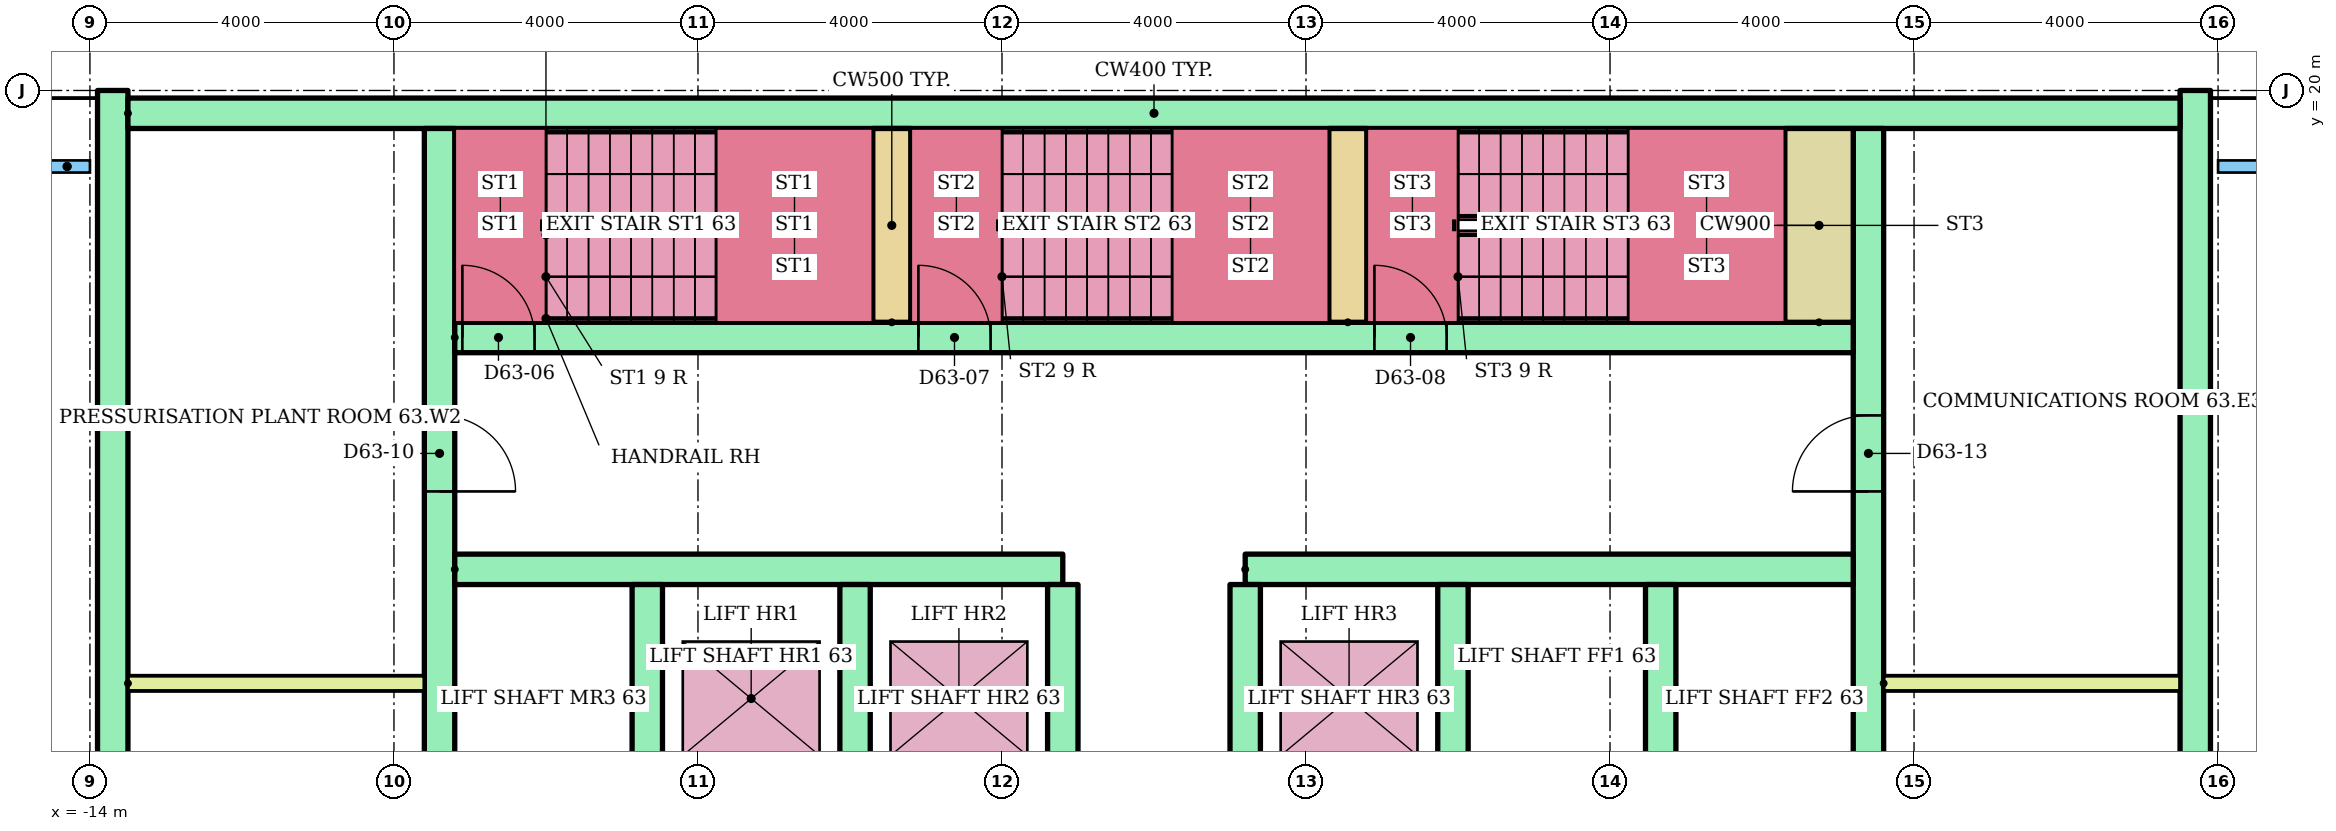
"""IFC4 building model, lengths in metres.
Left out: names, types, materials, properties, quantities, classifications, styles, units other than length and angle.
Written with IfcOpenShell. Run it as: python <this file> out.ifc"""

import sys

from ifc_helpers import new_model, si_unit, direction, frame, frame_2d, origin, place, context, subcontext, project, spatial, rectangle, extrude, element, fill, save


model = new_model("IFC4")
c1 = context("Model", 3, precision=1e-05, world=origin(), true_north=direction((0.0, 1.0)))
c2 = subcontext(c1, "Body", "Model", "MODEL_VIEW")
j1 = project(units=[si_unit("LENGTHUNIT", "METRE"), si_unit("PLANEANGLEUNIT", "RADIAN")], contexts=[c1])
p1 = place(None, origin())
s1 = spatial("IfcSite", under=j1, at=p1, CompositionType="ELEMENT")
p2 = place(p1, origin())
s2 = spatial("IfcBuilding", under=s1, at=p2, CompositionType="ELEMENT")
p3 = place(p2, frame((0.0, 0.0, 239.6)))
s3 = spatial("IfcBuildingStorey", under=s2, at=p3, CompositionType="ELEMENT", Elevation=239.6)
for number, where, z_axis, x_axis in (
    (1, (-13.7, 3.0, 0.0), (0.0, 0.0, 1.0), (0.0, 1.0, 0.0)),
    (2, (13.7, 3.0, 0.0), (0.0, 0.0, 1.0), (0.0, 1.0, 0.0)),
):
    element("IfcWall", number, at=place(p3, frame(where, z_axis=z_axis, x_axis=x_axis)), inside=s3, PredefinedType="SHEAR", context=c2, shape_type="SweptSolid", body=[
        extrude(rectangle(XDim=17.0, YDim=0.4, at=frame_2d((8.5, 0.0))), origin(), (0.0, 0.0, 1.0), 8.8),
    ])
p4 = place(p3, frame((-13.5, 19.7, 0.0)))
e3 = element("IfcWall", 3, at=p4, inside=s3, PredefinedType="SHEAR", context=c2, shape_type="SweptSolid", body=[
    extrude(rectangle(XDim=27.0, YDim=0.4, at=frame_2d((13.5, 0.0))), origin(), (0.0, 0.0, 1.0), 8.8),
])
p5 = place(p3, frame((-9.4, 6.8, 0.0), z_axis=(0.0, 0.0, 1.0), x_axis=(0.0, 1.0, 0.0)))
e4 = element("IfcWall", 4, at=p5, inside=s3, PredefinedType="SHEAR", context=c2, shape_type="SweptSolid", body=[
    extrude(rectangle(XDim=12.7, YDim=0.4, at=frame_2d((6.35, 0.0))), origin(), (0.0, 0.0, 1.0), 8.8),
])
p6 = place(p5, frame((1.15, 0.0, 0.0)))
e5 = element("IfcOpeningElement", 5, at=p6, cuts=e4, PredefinedType="OPENING", context=c2, shape_type="SweptSolid", body=[
    extrude(rectangle(XDim=1.0, YDim=2.1, at=frame_2d((0.5, 1.05))), frame((0.0, 0.21, 0.0), z_axis=(0.0, -1.0, 0.0), x_axis=(1.0, 0.0, 0.0)), (0.0, 0.0, 1.0), 0.42),
])
p7 = place(p5, frame((7.925, 0.0, 0.0)))
e6 = element("IfcOpeningElement", 6, at=p7, cuts=e4, PredefinedType="OPENING", context=c2, shape_type="SweptSolid", body=[
    extrude(rectangle(XDim=1.0, YDim=2.1, at=frame_2d((0.5, 1.05))), frame((0.0, 0.21, 0.0), z_axis=(0.0, -1.0, 0.0), x_axis=(1.0, 0.0, 0.0)), (0.0, 0.0, 1.0), 0.42),
])
p8 = place(p3, frame((9.4, 6.8, 0.0), z_axis=(0.0, 0.0, 1.0), x_axis=(0.0, 1.0, 0.0)))
e7 = element("IfcWall", 7, at=p8, inside=s3, PredefinedType="SHEAR", context=c2, shape_type="SweptSolid", body=[
    extrude(rectangle(XDim=12.7, YDim=0.4, at=frame_2d((6.35, 0.0))), origin(), (0.0, 0.0, 1.0), 8.8),
])
p9 = place(p8, frame((0.3, 0.0, 0.0)))
e8 = element("IfcOpeningElement", 8, at=p9, cuts=e7, PredefinedType="OPENING", context=c2, shape_type="SweptSolid", body=[
    extrude(rectangle(XDim=1.0, YDim=2.1, at=frame_2d((0.5, 1.05))), frame((0.0, 0.21, 0.0), z_axis=(0.0, -1.0, 0.0), x_axis=(1.0, 0.0, 0.0)), (0.0, 0.0, 1.0), 0.42),
])
p10 = place(p8, frame((2.05, 0.0, 0.0)))
e9 = element("IfcOpeningElement", 9, at=p10, cuts=e7, PredefinedType="OPENING", context=c2, shape_type="SweptSolid", body=[
    extrude(rectangle(XDim=1.0, YDim=2.1, at=frame_2d((0.5, 1.05))), frame((0.0, 0.21, 0.0), z_axis=(0.0, -1.0, 0.0), x_axis=(1.0, 0.0, 0.0)), (0.0, 0.0, 1.0), 0.42),
])
p11 = place(p8, frame((7.925, 0.0, 0.0)))
e10 = element("IfcOpeningElement", 10, at=p11, cuts=e7, PredefinedType="OPENING", context=c2, shape_type="SweptSolid", body=[
    extrude(rectangle(XDim=1.0, YDim=2.1, at=frame_2d((0.5, 1.05))), frame((0.0, 0.21, 0.0), z_axis=(0.0, -1.0, 0.0), x_axis=(1.0, 0.0, 0.0)), (0.0, 0.0, 1.0), 0.42),
])
for number, where in (
    (11, (-9.2, 13.7, 0.0)),
    (12, (1.2, 13.7, 0.0)),
):
    element("IfcWall", number, at=place(p3, frame(where)), inside=s3, PredefinedType="SHEAR", context=c2, shape_type="SweptSolid", body=[
        extrude(rectangle(XDim=8.0, YDim=0.4, at=frame_2d((4.0, 0.0))), origin(), (0.0, 0.0, 1.0), 8.8),
    ])
for number, where, z_axis, x_axis in (
    (13, (-6.667, 10.5, 0.0), (0.0, 0.0, 1.0), (0.0, 1.0, 0.0)),
    (14, (-3.933, 10.5, 0.0), (0.0, 0.0, 1.0), (0.0, 1.0, 0.0)),
    (15, (-1.2, 10.5, 0.0), (0.0, 0.0, 1.0), (0.0, 1.0, 0.0)),
    (16, (1.2, 10.5, 0.0), (0.0, 0.0, 1.0), (0.0, 1.0, 0.0)),
    (17, (3.933, 10.5, 0.0), (0.0, 0.0, 1.0), (0.0, 1.0, 0.0)),
    (18, (6.667, 10.5, 0.0), (0.0, 0.0, 1.0), (0.0, 1.0, 0.0)),
):
    element("IfcWall", number, at=place(p3, frame(where, z_axis=z_axis, x_axis=x_axis)), inside=s3, PredefinedType="SHEAR", context=c2, shape_type="SweptSolid", body=[
        extrude(rectangle(XDim=3.0, YDim=0.4, at=frame_2d((1.5, 0.0))), origin(), (0.0, 0.0, 1.0), 8.8),
    ])
p12 = place(p3, frame((-9.2, 16.75, 0.0)))
e19 = element("IfcWall", 19, at=p12, inside=s3, PredefinedType="SHEAR", context=c2, shape_type="SweptSolid", body=[
    extrude(rectangle(XDim=18.4, YDim=0.4, at=frame_2d((9.2, 0.0))), origin(), (0.0, 0.0, 1.0), 8.8),
])
p13 = place(p12, frame((0.1, 0.0, 0.0)))
e20 = element("IfcOpeningElement", 20, at=p13, cuts=e19, PredefinedType="OPENING", context=c2, shape_type="SweptSolid", body=[
    extrude(rectangle(XDim=0.95, YDim=2.1, at=frame_2d((0.475, 1.05))), frame((0.0, 0.21, 0.0), z_axis=(0.0, -1.0, 0.0), x_axis=(1.0, 0.0, 0.0)), (0.0, 0.0, 1.0), 0.42),
])
p14 = place(p12, frame((6.1, 0.0, 0.0)))
e21 = element("IfcOpeningElement", 21, at=p14, cuts=e19, PredefinedType="OPENING", context=c2, shape_type="SweptSolid", body=[
    extrude(rectangle(XDim=0.95, YDim=2.1, at=frame_2d((0.475, 1.05))), frame((0.0, 0.21, 0.0), z_axis=(0.0, -1.0, 0.0), x_axis=(1.0, 0.0, 0.0)), (0.0, 0.0, 1.0), 0.42),
])
p15 = place(p12, frame((12.1, 0.0, 0.0)))
e22 = element("IfcOpeningElement", 22, at=p15, cuts=e19, PredefinedType="OPENING", context=c2, shape_type="SweptSolid", body=[
    extrude(rectangle(XDim=0.95, YDim=2.1, at=frame_2d((0.475, 1.05))), frame((0.0, 0.21, 0.0), z_axis=(0.0, -1.0, 0.0), x_axis=(1.0, 0.0, 0.0)), (0.0, 0.0, 1.0), 0.42),
])
for number, where, z_axis, x_axis in (
    (23, (-3.45, 16.95, 0.0), (0.0, 0.0, 1.0), (0.0, 1.0, 0.0)),
    (24, (2.55, 16.95, 0.0), (0.0, 0.0, 1.0), (0.0, 1.0, 0.0)),
):
    element("IfcWall", number, at=place(p3, frame(where, z_axis=z_axis, x_axis=x_axis)), inside=s3, PredefinedType="SHEAR", context=c2, shape_type="SweptSolid", body=[
        extrude(rectangle(XDim=2.55, YDim=0.5, at=frame_2d((1.275, 0.0))), origin(), (0.0, 0.0, 1.0), 8.8),
    ])
p16 = place(p3, frame((8.75, 16.95, 0.0), z_axis=(0.0, 0.0, 1.0), x_axis=(0.0, 1.0, 0.0)))
e25 = element("IfcWall", 25, at=p16, inside=s3, PredefinedType="SHEAR", context=c2, shape_type="SweptSolid", body=[
    extrude(rectangle(XDim=2.55, YDim=0.9, at=frame_2d((1.275, 0.0))), origin(), (0.0, 0.0, 1.0), 8.8),
])
for number, where in (
    (26, (-13.5, 12.2, 0.0)),
    (27, (9.6, 12.2, 0.0)),
):
    element("IfcWall", number, at=place(p3, frame(where)), inside=s3, PredefinedType="PARTITIONING", context=c2, shape_type="SweptSolid", body=[
        extrude(rectangle(XDim=3.9, YDim=0.2, at=frame_2d((1.95, 0.0))), origin(), (0.0, 0.0, 1.0), 8.8),
    ])
p17 = place(p13, origin())
e28 = element("IfcDoor", 28, at=p17, inside=s3, OperationType="SINGLE_SWING_LEFT", PredefinedType="DOOR", context=c2, shape_type="SweptSolid", body=[
    extrude(rectangle(XDim=0.95, YDim=2.1, at=frame_2d((0.475, 1.05))), frame((0.0, 0.025, 0.0), z_axis=(0.0, -1.0, 0.0), x_axis=(1.0, 0.0, 0.0)), (0.0, 0.0, 1.0), 0.05),
])
fill(e20, e28)
p18 = place(p14, origin())
e29 = element("IfcDoor", 29, at=p18, inside=s3, OperationType="SINGLE_SWING_LEFT", PredefinedType="DOOR", context=c2, shape_type="SweptSolid", body=[
    extrude(rectangle(XDim=0.95, YDim=2.1, at=frame_2d((0.475, 1.05))), frame((0.0, 0.025, 0.0), z_axis=(0.0, -1.0, 0.0), x_axis=(1.0, 0.0, 0.0)), (0.0, 0.0, 1.0), 0.05),
])
fill(e21, e29)
p19 = place(p15, origin())
e30 = element("IfcDoor", 30, at=p19, inside=s3, OperationType="SINGLE_SWING_LEFT", PredefinedType="DOOR", context=c2, shape_type="SweptSolid", body=[
    extrude(rectangle(XDim=0.95, YDim=2.1, at=frame_2d((0.475, 1.05))), frame((0.0, 0.025, 0.0), z_axis=(0.0, -1.0, 0.0), x_axis=(1.0, 0.0, 0.0)), (0.0, 0.0, 1.0), 0.05),
])
fill(e22, e30)
p20 = place(p7, frame((1.0, 0.0, 0.0), z_axis=(0.0, 0.0, 1.0), x_axis=(-1.0, 0.0, 0.0)))
e31 = element("IfcDoor", 31, at=p20, inside=s3, OperationType="SINGLE_SWING_LEFT", PredefinedType="DOOR", context=c2, shape_type="SweptSolid", body=[
    extrude(rectangle(XDim=1.0, YDim=2.1, at=frame_2d((0.5, 1.05))), frame((0.0, 0.025, 0.0), z_axis=(0.0, -1.0, 0.0), x_axis=(1.0, 0.0, 0.0)), (0.0, 0.0, 1.0), 0.05),
])
fill(e6, e31)
p21 = place(p11, origin())
e32 = element("IfcDoor", 32, at=p21, inside=s3, OperationType="SINGLE_SWING_LEFT", PredefinedType="DOOR", context=c2, shape_type="SweptSolid", body=[
    extrude(rectangle(XDim=1.0, YDim=2.1, at=frame_2d((0.5, 1.05))), frame((0.0, 0.025, 0.0), z_axis=(0.0, -1.0, 0.0), x_axis=(1.0, 0.0, 0.0)), (0.0, 0.0, 1.0), 0.05),
])
fill(e10, e32)
save(model, sys.argv[1])
